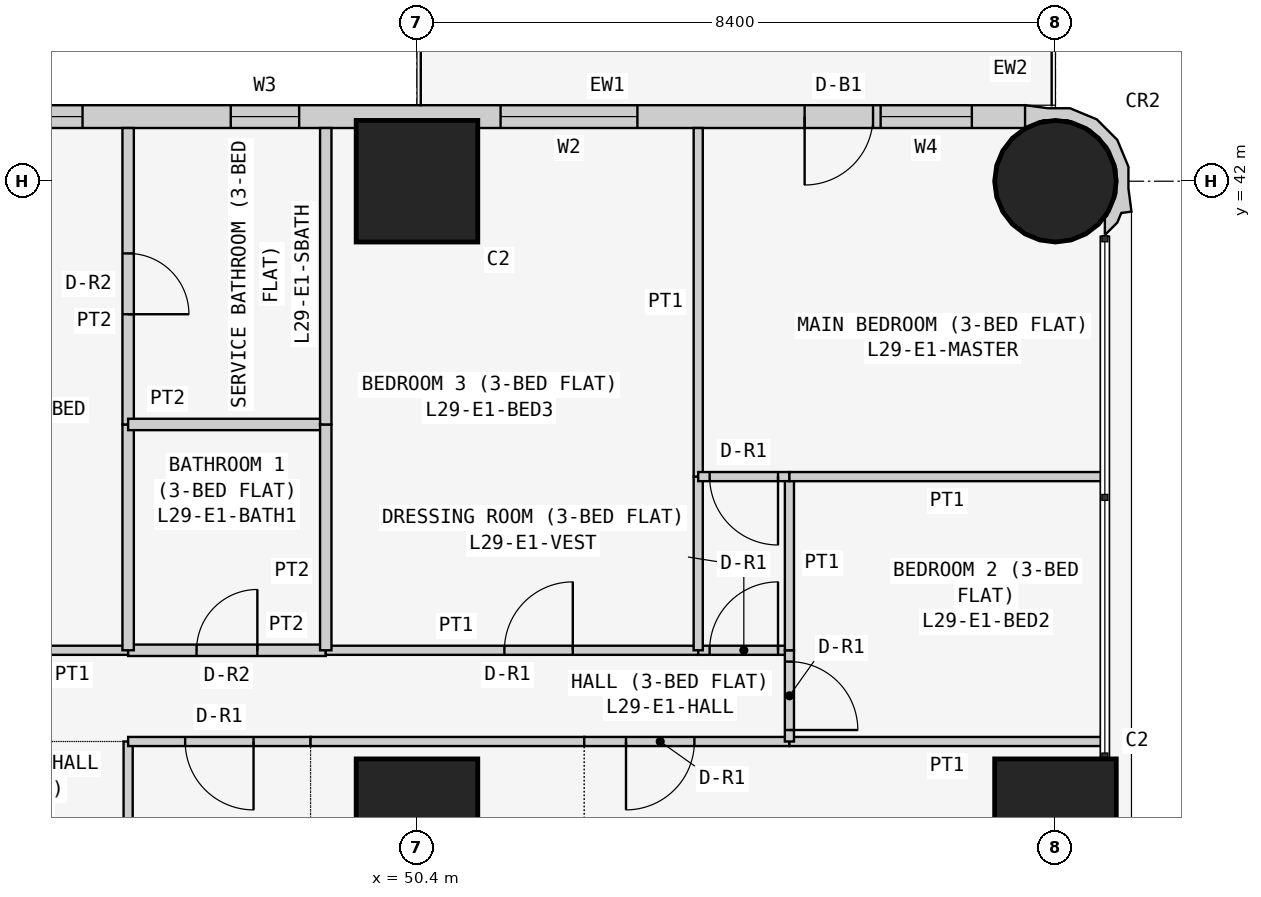
"""IFC4 building model, lengths in metres.
Left out: names, types, materials, properties, quantities, classifications, styles, units other than length and angle.
Written with IfcOpenShell. Run it as: python <this file> out.ifc"""

import sys

from ifc_helpers import new_model, si_unit, direction, frame, frame_2d, origin, origin_2d, place, context, subcontext, project, spatial, polyline, rectangle, circle, outline, extrude, element, fill, save


model = new_model("IFC4")
c1 = context("Model", 3, precision=1e-05, world=origin(), true_north=direction((0.0, 1.0)))
c2 = subcontext(c1, "Body", "Model", "MODEL_VIEW")
j1 = project(units=[si_unit("LENGTHUNIT", "METRE"), si_unit("PLANEANGLEUNIT", "RADIAN")], contexts=[c1])
p1 = place(None, origin())
s1 = spatial("IfcSite", under=j1, at=p1, CompositionType="ELEMENT")
p2 = place(p1, origin())
s2 = spatial("IfcBuilding", under=s1, at=p2, CompositionType="ELEMENT")
p3 = place(p2, frame((0.0, 0.0, 116.1)))
s3 = spatial("IfcBuildingStorey", under=s2, at=p3, CompositionType="ELEMENT", Elevation=116.1)
for number, where, z_axis, x_axis in (
    (1, (50.4, 33.6, 0.0), (0.0, 0.0, 1.0), (1.0, 0.0, 0.0)),
    (2, (50.4, 42.0, 0.0), (0.0, 0.0, 1.0), (1.0, 0.0, 0.0)),
    (3, (58.8, 33.6, 0.0), (0.0, 0.0, 1.0), (1.0, 0.0, 0.0)),
):
    element("IfcColumn", number, at=place(p3, frame(where, z_axis=z_axis, x_axis=x_axis)), inside=s3, PredefinedType="COLUMN", context=c2, shape_type="SweptSolid", body=[
        extrude(rectangle(XDim=1.6, YDim=1.6, at=origin_2d()), origin(), (0.0, 0.0, 1.0), 3.6),
    ])
p4 = place(p3, frame((58.8, 42.0, 0.0), z_axis=(0.0, 0.0, 1.0), x_axis=(1.0, 0.0, 0.0)))
e4 = element("IfcColumn", 4, at=p4, inside=s3, PredefinedType="COLUMN", context=c2, shape_type="SweptSolid", body=[
    extrude(circle(Radius=0.8, at=origin_2d()), origin(), (0.0, 0.0, 1.0), 3.6),
])
p5 = place(p3, frame((58.4, 42.85, 0.0), z_axis=(0.0, 0.0, 1.0), x_axis=(-1.0, 0.0, 0.0)))
e5 = element("IfcWall", 5, at=p5, inside=s3, PredefinedType="SOLIDWALL", context=c2, shape_type="SweptSolid", body=[
    extrude(rectangle(XDim=15.7, YDim=0.3, at=frame_2d((7.85, 0.0))), origin(), (0.0, 0.0, 1.0), 3.45),
])
p6 = place(p5, frame((12.4, 0.0, 0.9)))
e6 = element("IfcOpeningElement", 6, at=p6, cuts=e5, PredefinedType="OPENING", context=c2, shape_type="SweptSolid", body=[
    extrude(rectangle(XDim=1.8, YDim=1.5, at=frame_2d((0.9, 0.75))), frame((0.0, 0.16, 0.0), z_axis=(0.0, -1.0, 0.0), x_axis=(1.0, 0.0, 0.0)), (0.0, 0.0, 1.0), 0.32),
])
p7 = place(p5, frame((9.55, 0.0, 1.5)))
e7 = element("IfcOpeningElement", 7, at=p7, cuts=e5, PredefinedType="OPENING", context=c2, shape_type="SweptSolid", body=[
    extrude(rectangle(XDim=0.9, YDim=0.7, at=frame_2d((0.45, 0.35))), frame((0.0, 0.16, 0.0), z_axis=(0.0, -1.0, 0.0), x_axis=(1.0, 0.0, 0.0)), (0.0, 0.0, 1.0), 0.32),
])
p8 = place(p5, frame((5.1, 0.0, 0.9)))
e8 = element("IfcOpeningElement", 8, at=p8, cuts=e5, PredefinedType="OPENING", context=c2, shape_type="SweptSolid", body=[
    extrude(rectangle(XDim=1.8, YDim=1.5, at=frame_2d((0.9, 0.75))), frame((0.0, 0.16, 0.0), z_axis=(0.0, -1.0, 0.0), x_axis=(1.0, 0.0, 0.0)), (0.0, 0.0, 1.0), 0.32),
])
p9 = place(p5, frame((2.0, 0.0, 0.0)))
e9 = element("IfcOpeningElement", 9, at=p9, cuts=e5, PredefinedType="OPENING", context=c2, shape_type="SweptSolid", body=[
    extrude(rectangle(XDim=0.9, YDim=2.4, at=frame_2d((0.45, 1.2))), frame((0.0, 0.16, 0.0), z_axis=(0.0, -1.0, 0.0), x_axis=(1.0, 0.0, 0.0)), (0.0, 0.0, 1.0), 0.32),
])
p10 = place(p5, frame((0.7, 0.0, 0.9)))
e10 = element("IfcOpeningElement", 10, at=p10, cuts=e5, PredefinedType="OPENING", context=c2, shape_type="SweptSolid", body=[
    extrude(rectangle(XDim=1.2, YDim=1.5, at=frame_2d((0.6, 0.75))), frame((0.0, 0.16, 0.0), z_axis=(0.0, -1.0, 0.0), x_axis=(1.0, 0.0, 0.0)), (0.0, 0.0, 1.0), 0.32),
])
p11 = place(p3, frame((59.395, 41.352, 0.0), z_axis=(0.0, 0.0, 1.0), x_axis=(0.93923434088, 0.343276641956, 0.0)))
e11 = element("IfcWall", 11, at=p11, inside=s3, PredefinedType="SOLIDWALL", context=c2, shape_type="SweptSolid", body=[
    extrude(outline(polyline([(0.532, 0.393), (0.631, 0.663), (0.614, 1.044), (0.453, 1.391), (0.172, 1.649), (-0.097, 1.748), (-0.369, 1.89), (-0.509, 1.621), (-0.491, 1.615), (-0.479, 1.609), (-0.211, 1.62), (0.088, 1.511), (0.323, 1.295), (0.457, 1.006), (0.47, 0.688), (0.361, 0.389), (0.145, 0.154), (0.108, 0.136), (0.031, -0.075), (0.241, 0.023), (0.333, 0.124), (0.465, 0.094), (0.532, 0.393)])), origin(), (0.0, 0.0, 1.0), 3.45),
])
p12 = place(p3, frame((46.6, 29.4, 0.0), z_axis=(0.0, 0.0, 1.0), x_axis=(0.0, 1.0, 0.0)))
e12 = element("IfcWall", 12, at=p12, inside=s3, PredefinedType="PARTITIONING", context=c2, shape_type="SweptSolid", body=[
    extrude(rectangle(XDim=5.229, YDim=0.12, at=frame_2d((2.615, 0.0))), origin(), (0.0, 0.0, 1.0), 3.45),
])
p13 = place(p3, frame((49.0, 34.629, 0.0), z_axis=(0.0, 0.0, 1.0), x_axis=(-1.0, 0.0, 0.0)))
e13 = element("IfcWall", 13, at=p13, inside=s3, PredefinedType="PARTITIONING", context=c2, shape_type="SweptSolid", body=[
    extrude(rectangle(XDim=2.4, YDim=0.12, at=frame_2d((1.2, 0.0))), origin(), (0.0, 0.0, 1.0), 3.45),
])
p14 = place(p13, frame((0.75, 0.0, 0.0)))
e14 = element("IfcOpeningElement", 14, at=p14, cuts=e13, PredefinedType="OPENING", context=c2, shape_type="SweptSolid", body=[
    extrude(rectangle(XDim=0.9, YDim=2.1, at=frame_2d((0.45, 1.05))), frame((0.0, 0.07, 0.0), z_axis=(0.0, -1.0, 0.0), x_axis=(1.0, 0.0, 0.0)), (0.0, 0.0, 1.0), 0.14),
])
p15 = place(p3, frame((52.6, 34.629, 0.0), z_axis=(0.0, 0.0, 1.0), x_axis=(-1.0, 0.0, 0.0)))
e15 = element("IfcWall", 15, at=p15, inside=s3, PredefinedType="PARTITIONING", context=c2, shape_type="SweptSolid", body=[
    extrude(rectangle(XDim=3.6, YDim=0.12, at=frame_2d((1.8, 0.0))), origin(), (0.0, 0.0, 1.0), 3.45),
])
p16 = place(p3, frame((55.3, 34.629, 0.0), z_axis=(0.0, 0.0, 1.0), x_axis=(-1.0, 0.0, 0.0)))
e16 = element("IfcWall", 16, at=p16, inside=s3, PredefinedType="PARTITIONING", context=c2, shape_type="SweptSolid", body=[
    extrude(rectangle(XDim=2.7, YDim=0.12, at=frame_2d((1.35, 0.0))), origin(), (0.0, 0.0, 1.0), 3.45),
])
p17 = place(p16, frame((1.25, 0.0, 0.0)))
e17 = element("IfcOpeningElement", 17, at=p17, cuts=e16, PredefinedType="OPENING", context=c2, shape_type="SweptSolid", body=[
    extrude(rectangle(XDim=0.9, YDim=2.1, at=frame_2d((0.45, 1.05))), frame((0.0, 0.07, 0.0), z_axis=(0.0, -1.0, 0.0), x_axis=(1.0, 0.0, 0.0)), (0.0, 0.0, 1.0), 0.14),
])
p18 = place(p3, frame((59.45, 34.629, 0.0), z_axis=(0.0, 0.0, 1.0), x_axis=(-1.0, 0.0, 0.0)))
e18 = element("IfcWall", 18, at=p18, inside=s3, PredefinedType="PARTITIONING", context=c2, shape_type="SweptSolid", body=[
    extrude(rectangle(XDim=4.15, YDim=0.12, at=frame_2d((2.075, 0.0))), origin(), (0.0, 0.0, 1.0), 3.45),
])
p19 = place(p3, frame((46.6, 35.829, 0.0), z_axis=(0.0, 0.0, 1.0), x_axis=(-1.0, 0.0, 0.0)))
e19 = element("IfcWall", 19, at=p19, inside=s3, PredefinedType="PARTITIONING", context=c2, shape_type="SweptSolid", body=[
    extrude(rectangle(XDim=3.675, YDim=0.12, at=frame_2d((1.837, 0.0))), origin(), (0.0, 0.0, 1.0), 3.45),
])
p20 = place(p19, frame((1.35, 0.0, 0.0)))
e20 = element("IfcOpeningElement", 20, at=p20, cuts=e19, PredefinedType="OPENING", context=c2, shape_type="SweptSolid", body=[
    extrude(rectangle(XDim=0.9, YDim=2.1, at=frame_2d((0.45, 1.05))), frame((0.0, 0.07, 0.0), z_axis=(0.0, -1.0, 0.0), x_axis=(1.0, 0.0, 0.0)), (0.0, 0.0, 1.0), 0.14),
])
p21 = place(p3, frame((49.2, 35.829, 0.0), z_axis=(0.0, 0.0, 1.0), x_axis=(-1.0, 0.0, 0.0)))
e21 = element("IfcWall", 21, at=p21, inside=s3, PredefinedType="PARTITIONING", context=c2, shape_type="SweptSolid", body=[
    extrude(rectangle(XDim=2.6, YDim=0.15, at=frame_2d((1.3, 0.0))), origin(), (0.0, 0.0, 1.0), 3.45),
])
p22 = place(p21, frame((0.9, 0.0, 0.0)))
e22 = element("IfcOpeningElement", 22, at=p22, cuts=e21, PredefinedType="OPENING", context=c2, shape_type="SweptSolid", body=[
    extrude(rectangle(XDim=0.8, YDim=2.1, at=frame_2d((0.4, 1.05))), frame((0.0, 0.085, 0.0), z_axis=(0.0, -1.0, 0.0), x_axis=(1.0, 0.0, 0.0)), (0.0, 0.0, 1.0), 0.17),
])
p23 = place(p3, frame((54.1, 35.829, 0.0), z_axis=(0.0, 0.0, 1.0), x_axis=(-1.0, 0.0, 0.0)))
e23 = element("IfcWall", 23, at=p23, inside=s3, PredefinedType="PARTITIONING", context=c2, shape_type="SweptSolid", body=[
    extrude(rectangle(XDim=4.9, YDim=0.12, at=frame_2d((2.45, 0.0))), origin(), (0.0, 0.0, 1.0), 3.45),
])
p24 = place(p23, frame((1.65, 0.0, 0.0)))
e24 = element("IfcOpeningElement", 24, at=p24, cuts=e23, PredefinedType="OPENING", context=c2, shape_type="SweptSolid", body=[
    extrude(rectangle(XDim=0.9, YDim=2.1, at=frame_2d((0.45, 1.05))), frame((0.0, 0.07, 0.0), z_axis=(0.0, -1.0, 0.0), x_axis=(1.0, 0.0, 0.0)), (0.0, 0.0, 1.0), 0.14),
])
p25 = place(p3, frame((55.3, 35.829, 0.0), z_axis=(0.0, 0.0, 1.0), x_axis=(-1.0, 0.0, 0.0)))
e25 = element("IfcWall", 25, at=p25, inside=s3, PredefinedType="PARTITIONING", context=c2, shape_type="SweptSolid", body=[
    extrude(rectangle(XDim=1.2, YDim=0.12, at=frame_2d((0.6, 0.0))), origin(), (0.0, 0.0, 1.0), 3.45),
])
p26 = place(p25, frame((0.15, 0.0, 0.0)))
e26 = element("IfcOpeningElement", 26, at=p26, cuts=e25, PredefinedType="OPENING", context=c2, shape_type="SweptSolid", body=[
    extrude(rectangle(XDim=0.9, YDim=2.1, at=frame_2d((0.45, 1.05))), frame((0.0, 0.07, 0.0), z_axis=(0.0, -1.0, 0.0), x_axis=(1.0, 0.0, 0.0)), (0.0, 0.0, 1.0), 0.14),
])
p27 = place(p3, frame((55.3, 34.629, 0.0), z_axis=(0.0, 0.0, 1.0), x_axis=(0.0, 1.0, 0.0)))
e27 = element("IfcWall", 27, at=p27, inside=s3, PredefinedType="PARTITIONING", context=c2, shape_type="SweptSolid", body=[
    extrude(rectangle(XDim=1.2, YDim=0.12, at=frame_2d((0.6, 0.0))), origin(), (0.0, 0.0, 1.0), 3.45),
])
p28 = place(p27, frame((0.151, 0.0, 0.0)))
e28 = element("IfcOpeningElement", 28, at=p28, cuts=e27, PredefinedType="OPENING", context=c2, shape_type="SweptSolid", body=[
    extrude(rectangle(XDim=0.9, YDim=2.1, at=frame_2d((0.45, 1.05))), frame((0.0, 0.07, 0.0), z_axis=(0.0, -1.0, 0.0), x_axis=(1.0, 0.0, 0.0)), (0.0, 0.0, 1.0), 0.14),
])
p29 = place(p3, frame((46.6, 35.829, 0.0), z_axis=(0.0, 0.0, 1.0), x_axis=(0.0, 1.0, 0.0)))
e29 = element("IfcWall", 29, at=p29, inside=s3, PredefinedType="PARTITIONING", context=c2, shape_type="SweptSolid", body=[
    extrude(rectangle(XDim=2.971, YDim=0.15, at=frame_2d((1.485, 0.0))), origin(), (0.0, 0.0, 1.0), 3.45),
])
p30 = place(p3, frame((46.6, 38.8, 0.0), z_axis=(0.0, 0.0, 1.0), x_axis=(0.0, 1.0, 0.0)))
e30 = element("IfcWall", 30, at=p30, inside=s3, PredefinedType="PARTITIONING", context=c2, shape_type="SweptSolid", body=[
    extrude(rectangle(XDim=3.9, YDim=0.15, at=frame_2d((1.95, 0.0))), origin(), (0.0, 0.0, 1.0), 3.45),
])
p31 = place(p30, frame((1.45, 0.0, 0.0)))
e31 = element("IfcOpeningElement", 31, at=p31, cuts=e30, PredefinedType="OPENING", context=c2, shape_type="SweptSolid", body=[
    extrude(rectangle(XDim=0.8, YDim=2.1, at=frame_2d((0.4, 1.05))), frame((0.0, 0.085, 0.0), z_axis=(0.0, -1.0, 0.0), x_axis=(1.0, 0.0, 0.0)), (0.0, 0.0, 1.0), 0.17),
])
p32 = place(p3, frame((49.2, 38.8, 0.0), z_axis=(0.0, 0.0, 1.0), x_axis=(-1.0, 0.0, 0.0)))
e32 = element("IfcWall", 32, at=p32, inside=s3, PredefinedType="PARTITIONING", context=c2, shape_type="SweptSolid", body=[
    extrude(rectangle(XDim=2.6, YDim=0.15, at=frame_2d((1.3, 0.0))), origin(), (0.0, 0.0, 1.0), 3.45),
])
p33 = place(p3, frame((49.2, 35.829, 0.0), z_axis=(0.0, 0.0, 1.0), x_axis=(0.0, 1.0, 0.0)))
e33 = element("IfcWall", 33, at=p33, inside=s3, PredefinedType="PARTITIONING", context=c2, shape_type="SweptSolid", body=[
    extrude(rectangle(XDim=2.971, YDim=0.15, at=frame_2d((1.485, 0.0))), origin(), (0.0, 0.0, 1.0), 3.45),
])
p34 = place(p3, frame((49.2, 38.8, 0.0), z_axis=(0.0, 0.0, 1.0), x_axis=(0.0, 1.0, 0.0)))
e34 = element("IfcWall", 34, at=p34, inside=s3, PredefinedType="PARTITIONING", context=c2, shape_type="SweptSolid", body=[
    extrude(rectangle(XDim=3.9, YDim=0.15, at=frame_2d((1.95, 0.0))), origin(), (0.0, 0.0, 1.0), 3.45),
])
p35 = place(p3, frame((54.1, 35.829, 0.0), z_axis=(0.0, 0.0, 1.0), x_axis=(0.0, 1.0, 0.0)))
e35 = element("IfcWall", 35, at=p35, inside=s3, PredefinedType="PARTITIONING", context=c2, shape_type="SweptSolid", body=[
    extrude(rectangle(XDim=2.285, YDim=0.12, at=frame_2d((1.143, 0.0))), origin(), (0.0, 0.0, 1.0), 3.45),
])
p36 = place(p3, frame((54.1, 38.114, 0.0), z_axis=(0.0, 0.0, 1.0), x_axis=(0.0, 1.0, 0.0)))
e36 = element("IfcWall", 36, at=p36, inside=s3, PredefinedType="PARTITIONING", context=c2, shape_type="SweptSolid", body=[
    extrude(rectangle(XDim=4.586, YDim=0.12, at=frame_2d((2.293, 0.0))), origin(), (0.0, 0.0, 1.0), 3.45),
])
p37 = place(p3, frame((55.3, 35.829, 0.0), z_axis=(0.0, 0.0, 1.0), x_axis=(0.0, 1.0, 0.0)))
e37 = element("IfcWall", 37, at=p37, inside=s3, PredefinedType="PARTITIONING", context=c2, shape_type="SweptSolid", body=[
    extrude(rectangle(XDim=2.285, YDim=0.12, at=frame_2d((1.143, 0.0))), origin(), (0.0, 0.0, 1.0), 3.45),
])
p38 = place(p3, frame((55.3, 38.114, 0.0), z_axis=(0.0, 0.0, 1.0), x_axis=(-1.0, 0.0, 0.0)))
e38 = element("IfcWall", 38, at=p38, inside=s3, PredefinedType="PARTITIONING", context=c2, shape_type="SweptSolid", body=[
    extrude(rectangle(XDim=1.2, YDim=0.12, at=frame_2d((0.6, 0.0))), origin(), (0.0, 0.0, 1.0), 3.45),
])
p39 = place(p38, frame((0.15, 0.0, 0.0)))
e39 = element("IfcOpeningElement", 39, at=p39, cuts=e38, PredefinedType="OPENING", context=c2, shape_type="SweptSolid", body=[
    extrude(rectangle(XDim=0.9, YDim=2.1, at=frame_2d((0.45, 1.05))), frame((0.0, 0.07, 0.0), z_axis=(0.0, -1.0, 0.0), x_axis=(1.0, 0.0, 0.0)), (0.0, 0.0, 1.0), 0.14),
])
p40 = place(p3, frame((59.45, 38.114, 0.0), z_axis=(0.0, 0.0, 1.0), x_axis=(-1.0, 0.0, 0.0)))
e40 = element("IfcWall", 40, at=p40, inside=s3, PredefinedType="PARTITIONING", context=c2, shape_type="SweptSolid", body=[
    extrude(rectangle(XDim=4.15, YDim=0.12, at=frame_2d((2.075, 0.0))), origin(), (0.0, 0.0, 1.0), 3.45),
])
p41 = place(p6, origin())
e41 = element("IfcWindow", 41, at=p41, inside=s3, PartitioningType="SINGLE_PANEL", PredefinedType="WINDOW", context=c2, shape_type="SweptSolid", body=[
    extrude(rectangle(XDim=1.8, YDim=1.5, at=frame_2d((0.9, 0.75))), frame((0.0, 0.03, 0.0), z_axis=(0.0, -1.0, 0.0), x_axis=(1.0, 0.0, 0.0)), (0.0, 0.0, 1.0), 0.06),
])
fill(e6, e41)
p42 = place(p7, origin())
e42 = element("IfcWindow", 42, at=p42, inside=s3, PartitioningType="SINGLE_PANEL", PredefinedType="WINDOW", context=c2, shape_type="SweptSolid", body=[
    extrude(rectangle(XDim=0.9, YDim=0.7, at=frame_2d((0.45, 0.35))), frame((0.0, 0.03, 0.0), z_axis=(0.0, -1.0, 0.0), x_axis=(1.0, 0.0, 0.0)), (0.0, 0.0, 1.0), 0.06),
])
fill(e7, e42)
p43 = place(p8, origin())
e43 = element("IfcWindow", 43, at=p43, inside=s3, PartitioningType="SINGLE_PANEL", PredefinedType="WINDOW", context=c2, shape_type="SweptSolid", body=[
    extrude(rectangle(XDim=1.8, YDim=1.5, at=frame_2d((0.9, 0.75))), frame((0.0, 0.03, 0.0), z_axis=(0.0, -1.0, 0.0), x_axis=(1.0, 0.0, 0.0)), (0.0, 0.0, 1.0), 0.06),
])
fill(e8, e43)
p44 = place(p9, origin())
e44 = element("IfcDoor", 44, at=p44, inside=s3, OperationType="SINGLE_SWING_RIGHT", PredefinedType="DOOR", context=c2, shape_type="SweptSolid", body=[
    extrude(rectangle(XDim=0.9, YDim=2.4, at=frame_2d((0.45, 1.2))), frame((0.0, 0.025, 0.0), z_axis=(0.0, -1.0, 0.0), x_axis=(1.0, 0.0, 0.0)), (0.0, 0.0, 1.0), 0.05),
])
fill(e9, e44)
p45 = place(p10, origin())
e45 = element("IfcWindow", 45, at=p45, inside=s3, PartitioningType="SINGLE_PANEL", PredefinedType="WINDOW", context=c2, shape_type="SweptSolid", body=[
    extrude(rectangle(XDim=1.2, YDim=1.5, at=frame_2d((0.6, 0.75))), frame((0.0, 0.03, 0.0), z_axis=(0.0, -1.0, 0.0), x_axis=(1.0, 0.0, 0.0)), (0.0, 0.0, 1.0), 0.06),
])
fill(e10, e45)
p46 = place(p14, origin())
e46 = element("IfcDoor", 46, at=p46, inside=s3, OperationType="SINGLE_SWING_LEFT", PredefinedType="DOOR", context=c2, shape_type="SweptSolid", body=[
    extrude(rectangle(XDim=0.9, YDim=2.1, at=frame_2d((0.45, 1.05))), frame((0.0, 0.025, 0.0), z_axis=(0.0, -1.0, 0.0), x_axis=(1.0, 0.0, 0.0)), (0.0, 0.0, 1.0), 0.05),
])
fill(e14, e46)
p47 = place(p17, origin())
e47 = element("IfcDoor", 47, at=p47, inside=s3, OperationType="SINGLE_SWING_RIGHT", PredefinedType="DOOR", context=c2, shape_type="SweptSolid", body=[
    extrude(rectangle(XDim=0.9, YDim=2.1, at=frame_2d((0.45, 1.05))), frame((0.0, 0.025, 0.0), z_axis=(0.0, -1.0, 0.0), x_axis=(1.0, 0.0, 0.0)), (0.0, 0.0, 1.0), 0.05),
])
fill(e17, e47)
p48 = place(p31, frame((0.8, 0.0, 0.0), z_axis=(0.0, 0.0, 1.0), x_axis=(-1.0, 0.0, 0.0)))
e48 = element("IfcDoor", 48, at=p48, inside=s3, OperationType="SINGLE_SWING_RIGHT", PredefinedType="DOOR", context=c2, shape_type="SweptSolid", body=[
    extrude(rectangle(XDim=0.8, YDim=2.1, at=frame_2d((0.4, 1.05))), frame((0.0, 0.025, 0.0), z_axis=(0.0, -1.0, 0.0), x_axis=(1.0, 0.0, 0.0)), (0.0, 0.0, 1.0), 0.05),
])
fill(e31, e48)
p49 = place(p22, frame((0.8, 0.0, 0.0), z_axis=(0.0, 0.0, 1.0), x_axis=(-1.0, 0.0, 0.0)))
e49 = element("IfcDoor", 49, at=p49, inside=s3, OperationType="SINGLE_SWING_RIGHT", PredefinedType="DOOR", context=c2, shape_type="SweptSolid", body=[
    extrude(rectangle(XDim=0.8, YDim=2.1, at=frame_2d((0.4, 1.05))), frame((0.0, 0.025, 0.0), z_axis=(0.0, -1.0, 0.0), x_axis=(1.0, 0.0, 0.0)), (0.0, 0.0, 1.0), 0.05),
])
fill(e22, e49)
p50 = place(p24, frame((0.9, 0.0, 0.0), z_axis=(0.0, 0.0, 1.0), x_axis=(-1.0, 0.0, 0.0)))
e50 = element("IfcDoor", 50, at=p50, inside=s3, OperationType="SINGLE_SWING_RIGHT", PredefinedType="DOOR", context=c2, shape_type="SweptSolid", body=[
    extrude(rectangle(XDim=0.9, YDim=2.1, at=frame_2d((0.45, 1.05))), frame((0.0, 0.025, 0.0), z_axis=(0.0, -1.0, 0.0), x_axis=(1.0, 0.0, 0.0)), (0.0, 0.0, 1.0), 0.05),
])
fill(e24, e50)
p51 = place(p26, frame((0.9, 0.0, 0.0), z_axis=(0.0, 0.0, 1.0), x_axis=(-1.0, 0.0, 0.0)))
e51 = element("IfcDoor", 51, at=p51, inside=s3, OperationType="SINGLE_SWING_RIGHT", PredefinedType="DOOR", context=c2, shape_type="SweptSolid", body=[
    extrude(rectangle(XDim=0.9, YDim=2.1, at=frame_2d((0.45, 1.05))), frame((0.0, 0.025, 0.0), z_axis=(0.0, -1.0, 0.0), x_axis=(1.0, 0.0, 0.0)), (0.0, 0.0, 1.0), 0.05),
])
fill(e26, e51)
p52 = place(p39, origin())
e52 = element("IfcDoor", 52, at=p52, inside=s3, OperationType="SINGLE_SWING_LEFT", PredefinedType="DOOR", context=c2, shape_type="SweptSolid", body=[
    extrude(rectangle(XDim=0.9, YDim=2.1, at=frame_2d((0.45, 1.05))), frame((0.0, 0.025, 0.0), z_axis=(0.0, -1.0, 0.0), x_axis=(1.0, 0.0, 0.0)), (0.0, 0.0, 1.0), 0.05),
])
fill(e39, e52)
p53 = place(p28, frame((0.9, 0.0, 0.0), z_axis=(0.0, 0.0, 1.0), x_axis=(-1.0, 0.0, 0.0)))
e53 = element("IfcDoor", 53, at=p53, inside=s3, OperationType="SINGLE_SWING_RIGHT", PredefinedType="DOOR", context=c2, shape_type="SweptSolid", body=[
    extrude(rectangle(XDim=0.9, YDim=2.1, at=frame_2d((0.45, 1.05))), frame((0.0, 0.025, 0.0), z_axis=(0.0, -1.0, 0.0), x_axis=(1.0, 0.0, 0.0)), (0.0, 0.0, 1.0), 0.05),
])
fill(e28, e53)
save(model, sys.argv[1])
